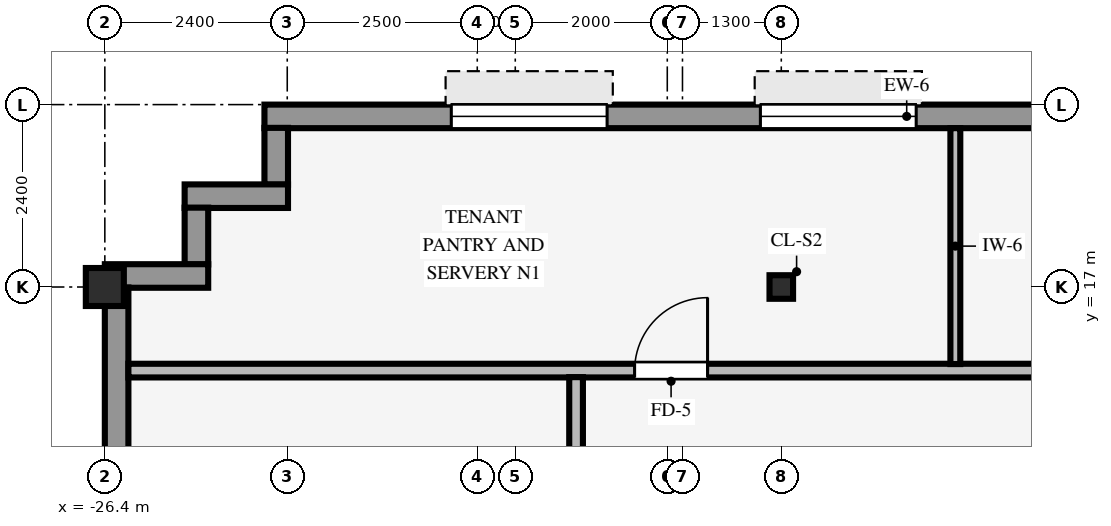
"""IFC4 building model, lengths in metres.
Left out: names, types, materials, properties, quantities, classifications, styles, units other than length and angle.
Written with IfcOpenShell. Run it as: python <this file> out.ifc"""

import sys

from ifc_helpers import new_model, si_unit, direction, frame, frame_2d, origin, origin_2d, place, context, subcontext, project, spatial, rectangle, hollow_rectangle, i_section, extrude, source, transform, mapped, element, fill, save


model = new_model("IFC4")
c1 = context("Model", 3, precision=1e-05, world=origin(), true_north=direction((0.0, 1.0)))
c2 = subcontext(c1, "Body", "Model", "MODEL_VIEW")
j1 = project(units=[si_unit("LENGTHUNIT", "METRE"), si_unit("PLANEANGLEUNIT", "RADIAN")], contexts=[c1])
p1 = place(None, origin())
s1 = spatial("IfcSite", under=j1, at=p1, CompositionType="ELEMENT")
p2 = place(p1, origin())
s2 = spatial("IfcBuilding", under=s1, at=p2, CompositionType="ELEMENT")
p3 = place(p2, frame((0.0, 0.0, 209.15)))
s3 = spatial("IfcBuildingStorey", under=s2, at=p3, CompositionType="ELEMENT", Elevation=209.15)
p4 = place(p3, frame((-26.4, 17.0, 0.0), z_axis=(0.0, 0.0, 1.0), x_axis=(1.0, 0.0, 0.0)))
e1 = element("IfcColumn", 1, at=p4, inside=s3, PredefinedType="COLUMN", context=c2, shape_type="SweptSolid", body=[
    extrude(hollow_rectangle(XDim=0.5, YDim=0.5, WallThickness=0.032, InnerFilletRadius=0.032, OuterFilletRadius=0.064, at=origin_2d()), origin(), (0.0, 0.0, 1.0), 3.37),
])
p5 = place(p3, frame((-17.5, 17.0, 0.0), z_axis=(0.0, 0.0, 1.0), x_axis=(1.0, 0.0, 0.0)))
e2 = element("IfcColumn", 2, at=p5, inside=s3, PredefinedType="COLUMN", context=c2, shape_type="SweptSolid", body=[
    extrude(i_section(OverallWidth=0.31, OverallDepth=0.31, WebThickness=0.015, FlangeThickness=0.015, FilletRadius=0.015, at=origin_2d()), origin(), (0.0, 0.0, 1.0), 3.37),
])
p6 = place(p3, frame((-24.3, 19.245, 0.0), z_axis=(0.0, 0.0, 1.0), x_axis=(1.0, 0.0, 0.0)))
e3 = element("IfcWall", 3, at=p6, inside=s3, PredefinedType="STANDARD", context=c2, shape_type="SweptSolid", body=[
    extrude(rectangle(XDim=16.9, YDim=0.31, at=frame_2d((8.45, 0.0))), origin(), (0.0, 0.0, 1.0), 2.705),
])
p7 = place(p6, frame((2.458, 0.0, 0.8)))
e4 = element("IfcOpeningElement", 4, at=p7, cuts=e3, PredefinedType="OPENING", context=c2, shape_type="SweptSolid", body=[
    extrude(rectangle(XDim=2.05, YDim=1.52, at=frame_2d((1.025, 0.76))), frame((0.0, 0.165, 0.0), z_axis=(0.0, -1.0, 0.0), x_axis=(1.0, 0.0, 0.0)), (0.0, 0.0, 1.0), 0.33),
])
p8 = place(p6, frame((6.525, 0.0, 0.8)))
e5 = element("IfcOpeningElement", 5, at=p8, cuts=e3, PredefinedType="OPENING", context=c2, shape_type="SweptSolid", body=[
    extrude(rectangle(XDim=2.05, YDim=1.52, at=frame_2d((1.025, 0.76))), frame((0.0, 0.165, 0.0), z_axis=(0.0, -1.0, 0.0), x_axis=(1.0, 0.0, 0.0)), (0.0, 0.0, 1.0), 0.33),
])
p9 = place(p6, frame((12.392, 0.0, 0.8)))
e6 = element("IfcOpeningElement", 6, at=p9, cuts=e3, PredefinedType="OPENING", context=c2, shape_type="SweptSolid", body=[
    extrude(rectangle(XDim=2.05, YDim=1.52, at=frame_2d((1.025, 0.76))), frame((0.0, 0.165, 0.0), z_axis=(0.0, -1.0, 0.0), x_axis=(1.0, 0.0, 0.0)), (0.0, 0.0, 1.0), 0.33),
])
p10 = place(p3, frame((-24.145, 18.346, 0.0), z_axis=(0.0, 0.0, 1.0), x_axis=(0.0, 1.0, 0.0)))
e7 = element("IfcWall", 7, at=p10, inside=s3, PredefinedType="STANDARD", context=c2, shape_type="SweptSolid", body=[
    extrude(rectangle(XDim=0.748, YDim=0.31, at=frame_2d((0.374, 0.0))), origin(), (0.0, 0.0, 1.0), 2.816),
])
p11 = place(p3, frame((-25.35, 18.195, 0.0), z_axis=(0.0, 0.0, 1.0), x_axis=(1.0, 0.0, 0.0)))
e8 = element("IfcWall", 8, at=p11, inside=s3, PredefinedType="STANDARD", context=c2, shape_type="SweptSolid", body=[
    extrude(rectangle(XDim=1.36, YDim=0.31, at=frame_2d((0.68, 0.0))), origin(), (0.0, 0.0, 1.0), 2.816),
])
p12 = place(p3, frame((-25.195, 17.296, 0.0), z_axis=(0.0, 0.0, 1.0), x_axis=(0.0, 1.0, 0.0)))
e9 = element("IfcWall", 9, at=p12, inside=s3, PredefinedType="STANDARD", context=c2, shape_type="SweptSolid", body=[
    extrude(rectangle(XDim=0.748, YDim=0.31, at=frame_2d((0.374, 0.0))), origin(), (0.0, 0.0, 1.0), 2.816),
])
p13 = place(p3, frame((-26.4, 17.145, 0.0), z_axis=(0.0, 0.0, 1.0), x_axis=(1.0, 0.0, 0.0)))
e10 = element("IfcWall", 10, at=p13, inside=s3, PredefinedType="STANDARD", context=c2, shape_type="SweptSolid", body=[
    extrude(rectangle(XDim=1.36, YDim=0.31, at=frame_2d((0.68, 0.0))), origin(), (0.0, 0.0, 1.0), 2.816),
])
p14 = place(p3, frame((-26.245, -16.994, 0.0), z_axis=(0.0, 0.0, 1.0), x_axis=(0.0, 1.0, 0.0)))
e11 = element("IfcWall", 11, at=p14, inside=s3, PredefinedType="STANDARD", context=c2, shape_type="SweptSolid", body=[
    extrude(rectangle(XDim=33.988, YDim=0.31, at=frame_2d((16.994, 0.0))), origin(), (0.0, 0.0, 1.0), 2.705),
])
p15 = place(p14, frame((21.194, 0.0, 0.0)))
e12 = element("IfcOpeningElement", 12, at=p15, cuts=e11, PredefinedType="OPENING", context=c2, shape_type="SweptSolid", body=[
    extrude(rectangle(XDim=1.05, YDim=2.1, at=frame_2d((0.525, 1.05))), frame((0.0, 0.165, 0.0), z_axis=(0.0, -1.0, 0.0), x_axis=(1.0, 0.0, 0.0)), (0.0, 0.0, 1.0), 0.33),
])
p16 = place(p14, frame((2.66, 0.0, 0.8)))
e13 = element("IfcOpeningElement", 13, at=p16, cuts=e11, PredefinedType="OPENING", context=c2, shape_type="SweptSolid", body=[
    extrude(rectangle(XDim=1.25, YDim=1.52, at=frame_2d((0.625, 0.76))), frame((0.0, 0.165, 0.0), z_axis=(0.0, -1.0, 0.0), x_axis=(1.0, 0.0, 0.0)), (0.0, 0.0, 1.0), 0.33),
])
p17 = place(p14, frame((8.13, 0.0, 0.8)))
e14 = element("IfcOpeningElement", 14, at=p17, cuts=e11, PredefinedType="OPENING", context=c2, shape_type="SweptSolid", body=[
    extrude(rectangle(XDim=1.25, YDim=1.52, at=frame_2d((0.625, 0.76))), frame((0.0, 0.165, 0.0), z_axis=(0.0, -1.0, 0.0), x_axis=(1.0, 0.0, 0.0)), (0.0, 0.0, 1.0), 0.33),
])
p18 = place(p14, frame((11.799, 0.0, 0.8)))
e15 = element("IfcOpeningElement", 15, at=p18, cuts=e11, PredefinedType="OPENING", context=c2, shape_type="SweptSolid", body=[
    extrude(rectangle(XDim=1.25, YDim=1.52, at=frame_2d((0.625, 0.76))), frame((0.0, 0.165, 0.0), z_axis=(0.0, -1.0, 0.0), x_axis=(1.0, 0.0, 0.0)), (0.0, 0.0, 1.0), 0.33),
])
p19 = place(p14, frame((17.719, 0.0, 0.8)))
e16 = element("IfcOpeningElement", 16, at=p19, cuts=e11, PredefinedType="OPENING", context=c2, shape_type="SweptSolid", body=[
    extrude(rectangle(XDim=1.25, YDim=1.52, at=frame_2d((0.625, 0.76))), frame((0.0, 0.165, 0.0), z_axis=(0.0, -1.0, 0.0), x_axis=(1.0, 0.0, 0.0)), (0.0, 0.0, 1.0), 0.33),
])
p20 = place(p14, frame((19.589, 0.0, 0.8)))
e17 = element("IfcOpeningElement", 17, at=p20, cuts=e11, PredefinedType="OPENING", context=c2, shape_type="SweptSolid", body=[
    extrude(rectangle(XDim=1.25, YDim=1.52, at=frame_2d((0.625, 0.76))), frame((0.0, 0.165, 0.0), z_axis=(0.0, -1.0, 0.0), x_axis=(1.0, 0.0, 0.0)), (0.0, 0.0, 1.0), 0.33),
])
p21 = place(p14, frame((24.608, 0.0, 0.8)))
e18 = element("IfcOpeningElement", 18, at=p21, cuts=e11, PredefinedType="OPENING", context=c2, shape_type="SweptSolid", body=[
    extrude(rectangle(XDim=1.25, YDim=1.52, at=frame_2d((0.625, 0.76))), frame((0.0, 0.165, 0.0), z_axis=(0.0, -1.0, 0.0), x_axis=(1.0, 0.0, 0.0)), (0.0, 0.0, 1.0), 0.33),
])
p22 = place(p14, frame((30.078, 0.0, 0.8)))
e19 = element("IfcOpeningElement", 19, at=p22, cuts=e11, PredefinedType="OPENING", context=c2, shape_type="SweptSolid", body=[
    extrude(rectangle(XDim=1.25, YDim=1.52, at=frame_2d((0.625, 0.76))), frame((0.0, 0.165, 0.0), z_axis=(0.0, -1.0, 0.0), x_axis=(1.0, 0.0, 0.0)), (0.0, 0.0, 1.0), 0.33),
])
p23 = place(p3, frame((-26.09, 15.9, 0.0), z_axis=(0.0, 0.0, 1.0), x_axis=(1.0, 0.0, 0.0)))
e20 = element("IfcWall", 20, at=p23, inside=s3, PredefinedType="PARTITIONING", context=c2, shape_type="SweptSolid", body=[
    extrude(rectangle(XDim=35.09, YDim=0.18, at=frame_2d((17.545, 0.0))), origin(), (0.0, 0.0, 1.0), 3.36),
])
p24 = place(p23, frame((21.305, 0.0, 0.0)))
e21 = element("IfcOpeningElement", 21, at=p24, cuts=e20, PredefinedType="OPENING", context=c2, shape_type="SweptSolid", body=[
    extrude(rectangle(XDim=0.96, YDim=2.1, at=frame_2d((0.48, 1.05))), frame((0.0, 0.1, 0.0), z_axis=(0.0, -1.0, 0.0), x_axis=(1.0, 0.0, 0.0)), (0.0, 0.0, 1.0), 0.2),
])
p25 = place(p23, frame((6.66, 0.0, 0.0)))
e22 = element("IfcOpeningElement", 22, at=p25, cuts=e20, PredefinedType="OPENING", context=c2, shape_type="SweptSolid", body=[
    extrude(rectangle(XDim=0.96, YDim=2.1, at=frame_2d((0.48, 1.05))), frame((0.0, 0.1, 0.0), z_axis=(0.0, -1.0, 0.0), x_axis=(1.0, 0.0, 0.0)), (0.0, 0.0, 1.0), 0.2),
])
p26 = place(p3, frame((-20.2, -15.814, 0.0), z_axis=(0.0, 0.0, 1.0), x_axis=(0.0, 1.0, 0.0)))
e23 = element("IfcWall", 23, at=p26, inside=s3, PredefinedType="PARTITIONING", context=c2, shape_type="SweptSolid", body=[
    extrude(rectangle(XDim=31.628, YDim=0.18, at=frame_2d((15.814, 0.0))), origin(), (0.0, 0.0, 1.0), 3.36),
])
p27 = place(p26, frame((15.334, 0.0, 0.0)))
e24 = element("IfcOpeningElement", 24, at=p27, cuts=e23, PredefinedType="OPENING", context=c2, shape_type="SweptSolid", body=[
    extrude(rectangle(XDim=0.96, YDim=2.1, at=frame_2d((0.48, 1.05))), frame((0.0, 0.1, 0.0), z_axis=(0.0, -1.0, 0.0), x_axis=(1.0, 0.0, 0.0)), (0.0, 0.0, 1.0), 0.2),
])
p28 = place(p3, frame((-15.21, 15.986, 0.0), z_axis=(0.0, 0.0, 1.0), x_axis=(0.0, 1.0, 0.0)))
e25 = element("IfcWall", 25, at=p28, inside=s3, PredefinedType="PARTITIONING", context=c2, shape_type="SweptSolid", body=[
    extrude(rectangle(XDim=3.104, YDim=0.13, at=frame_2d((1.552, 0.0))), origin(), (0.0, 0.0, 1.0), 3.36),
])
m1 = source(origin(), c2, "Body", "SweptSolid", [
    extrude(rectangle(XDim=2.05, YDim=1.52, at=frame_2d((1.025, 0.76))), frame((0.0, 0.03, 0.0), z_axis=(0.0, -1.0, 0.0), x_axis=(1.0, 0.0, 0.0)), (0.0, 0.0, 1.0), 0.06),
])
p29 = place(p7, origin())
e26 = element("IfcWindow", 26, at=p29, inside=s3, PartitioningType="SINGLE_PANEL", PredefinedType="WINDOW", context=c2, shape_type="MappedRepresentation", body=[
    mapped(m1, transform((0.0, 0.0, 0.0), scale=1.0)),
])
fill(e4, e26)
p30 = place(p8, origin())
e27 = element("IfcWindow", 27, at=p30, inside=s3, PartitioningType="SINGLE_PANEL", PredefinedType="WINDOW", context=c2, shape_type="MappedRepresentation", body=[
    mapped(m1, transform((0.0, 0.0, 0.0), scale=1.0)),
])
fill(e5, e27)
m2 = source(origin(), c2, "Body", "SweptSolid", [
    extrude(rectangle(XDim=0.96, YDim=2.1, at=frame_2d((0.48, 1.05))), frame((0.0, 0.025, 0.0), z_axis=(0.0, -1.0, 0.0), x_axis=(1.0, 0.0, 0.0)), (0.0, 0.0, 1.0), 0.05),
])
p31 = place(p25, origin())
e28 = element("IfcDoor", 28, at=p31, inside=s3, OperationType="SINGLE_SWING_RIGHT", PredefinedType="DOOR", context=c2, shape_type="MappedRepresentation", body=[
    mapped(m2, transform((0.0, 0.0, 0.0), scale=1.0)),
])
fill(e22, e28)
save(model, sys.argv[1])
